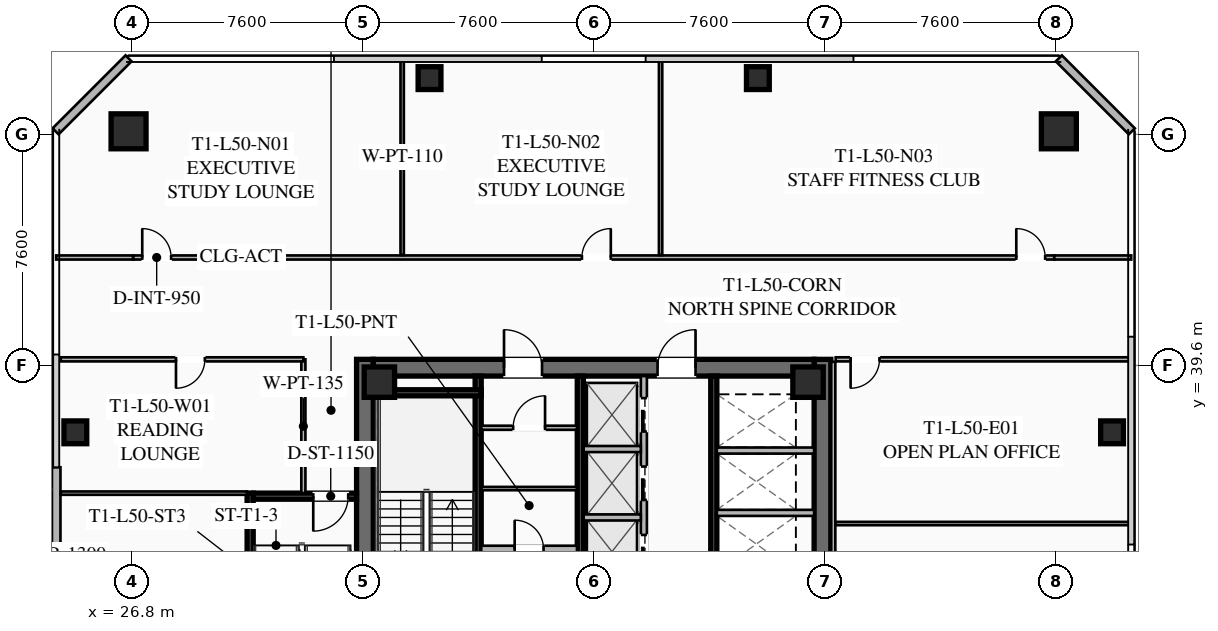
"""IFC4 building model, lengths in metres.
Left out: names, types, materials, properties, quantities, classifications, styles, units other than length and angle.
Written with IfcOpenShell. Run it as: python <this file> out.ifc"""

import sys

from ifc_helpers import new_model, si_unit, direction, frame, frame_2d, origin, origin_2d, place, context, subcontext, project, spatial, rectangle, hollow_rectangle, extrude, element, fill, save


model = new_model("IFC4")
c1 = context("Model", 3, precision=1e-05, world=origin(), true_north=direction((0.0, 1.0)))
c2 = subcontext(c1, "Body", "Model", "MODEL_VIEW")
j1 = project(units=[si_unit("LENGTHUNIT", "METRE"), si_unit("PLANEANGLEUNIT", "RADIAN")], contexts=[c1])
p1 = place(None, origin())
s1 = spatial("IfcSite", under=j1, at=p1, CompositionType="ELEMENT")
p2 = place(p1, origin())
s2 = spatial("IfcBuilding", under=s1, at=p2, CompositionType="ELEMENT")
p3 = place(p2, frame((0.0, 0.0, 185.4)))
s3 = spatial("IfcBuildingStorey", under=s2, at=p3, CompositionType="ELEMENT", Elevation=185.4)
for number, where, z_axis, x_axis in (
    (1, (34.475, 24.2, 0.0), (0.0, 0.0, 1.0), (0.0, 1.0, 0.0)),
    (2, (49.525, 39.8, 0.0), (0.0, 0.0, 1.0), (0.0, -1.0, 0.0)),
):
    element("IfcWall", number, at=place(p3, frame(where, z_axis=z_axis, x_axis=x_axis)), inside=s3, PredefinedType="SHEAR", context=c2, shape_type="SweptSolid", body=[
        extrude(rectangle(XDim=15.6, YDim=0.55, at=frame_2d((7.8, 0.0))), origin(), (0.0, 0.0, 1.0), 3.55),
    ])
p4 = place(p3, frame((34.75, 39.525, 0.0), z_axis=(0.0, 0.0, 1.0), x_axis=(1.0, 0.0, 0.0)))
e3 = element("IfcWall", 3, at=p4, inside=s3, PredefinedType="SHEAR", context=c2, shape_type="SweptSolid", body=[
    extrude(rectangle(XDim=14.5, YDim=0.55, at=frame_2d((7.25, 0.0))), origin(), (0.0, 0.0, 1.0), 3.55),
])
p5 = place(p4, frame((4.3, 0.0, 0.0)))
e4 = element("IfcOpeningElement", 4, at=p5, cuts=e3, PredefinedType="OPENING", context=c2, shape_type="SweptSolid", body=[
    extrude(rectangle(XDim=1.25, YDim=2.25, at=frame_2d((0.625, 1.125))), frame((0.0, 0.285, 0.0), z_axis=(0.0, -1.0, 0.0), x_axis=(1.0, 0.0, 0.0)), (0.0, 0.0, 1.0), 0.57),
])
p6 = place(p4, frame((9.35, 0.0, 0.0)))
e5 = element("IfcOpeningElement", 5, at=p6, cuts=e3, PredefinedType="OPENING", context=c2, shape_type="SweptSolid", body=[
    extrude(rectangle(XDim=1.25, YDim=2.25, at=frame_2d((0.625, 1.125))), frame((0.0, 0.285, 0.0), z_axis=(0.0, -1.0, 0.0), x_axis=(1.0, 0.0, 0.0)), (0.0, 0.0, 1.0), 0.57),
])
for number, where, z_axis, x_axis in (
    (6, (49.05, 39.05, 0.0), (0.0, 0.0, 1.0), (1.0, 0.0, 0.0)),
    (7, (34.95, 39.05, 0.0), (0.0, 0.0, 1.0), (1.0, 0.0, 0.0)),
):
    element("IfcColumn", number, at=place(p3, frame(where, z_axis=z_axis, x_axis=x_axis)), inside=s3, PredefinedType="COLUMN", context=c2, shape_type="SweptSolid", body=[
        extrude(hollow_rectangle(XDim=1.0, YDim=1.0, WallThickness=0.04, at=origin_2d()), origin(), (0.0, 0.0, 1.0), 3.37),
    ])
for number, where, z_axis, x_axis in (
    (8, (57.3, 47.3, 0.0), (0.0, 0.0, 1.0), (1.0, 0.0, 0.0)),
    (9, (26.7, 47.3, 0.0), (0.0, 0.0, 1.0), (1.0, 0.0, 0.0)),
):
    element("IfcColumn", number, at=place(p3, frame(where, z_axis=z_axis, x_axis=x_axis)), inside=s3, PredefinedType="COLUMN", context=c2, shape_type="SweptSolid", body=[
        extrude(hollow_rectangle(XDim=1.15, YDim=1.15, WallThickness=0.045, at=origin_2d()), origin(), (0.0, 0.0, 1.0), 3.37),
    ])
for number, where, z_axis, x_axis in (
    (10, (59.05, 37.4, 0.0), (0.0, 0.0, 1.0), (1.0, 0.0, 0.0)),
    (11, (47.4, 49.05, 0.0), (0.0, 0.0, 1.0), (1.0, 0.0, 0.0)),
    (12, (36.6, 49.05, 0.0), (0.0, 0.0, 1.0), (1.0, 0.0, 0.0)),
    (13, (24.95, 37.4, 0.0), (0.0, 0.0, 1.0), (1.0, 0.0, 0.0)),
):
    element("IfcColumn", number, at=place(p3, frame(where, z_axis=z_axis, x_axis=x_axis)), inside=s3, PredefinedType="COLUMN", context=c2, shape_type="SweptSolid", body=[
        extrude(hollow_rectangle(XDim=0.75, YDim=0.75, WallThickness=0.032, at=origin_2d()), origin(), (0.0, 0.0, 1.0), 3.37),
    ])
p7 = place(p3, frame((24.32, 27.75, 0.0), z_axis=(0.0, 0.0, 1.0), x_axis=(0.0, 1.0, 0.0)))
e14 = element("IfcWall", 14, at=p7, inside=s3, PredefinedType="SOLIDWALL", context=c2, shape_type="SweptSolid", body=[
    extrude(rectangle(XDim=8.5, YDim=0.28, at=frame_2d((4.25, 0.0))), origin(), (0.0, 0.0, 1.0), 3.37),
])
p8 = place(p7, frame((3.6, 0.0, 0.0)))
e15 = element("IfcOpeningElement", 15, at=p8, cuts=e14, PredefinedType="OPENING", context=c2, shape_type="SweptSolid", body=[
    extrude(rectangle(XDim=1.3, YDim=2.15, at=frame_2d((0.65, 1.075))), frame((0.0, 0.15, 0.0), z_axis=(0.0, -1.0, 0.0), x_axis=(1.0, 0.0, 0.0)), (0.0, 0.0, 1.0), 0.3),
])
for number, where, z_axis, x_axis in (
    (16, (24.3, 47.3, 0.0), (0.0, 0.0, 1.0), (0.707, 0.707, 0.0)),
    (17, (57.3, 49.7, 0.0), (0.0, 0.0, 1.0), (0.707, -0.707, 0.0)),
):
    element("IfcWall", number, at=place(p3, frame(where, z_axis=z_axis, x_axis=x_axis)), inside=s3, PredefinedType="SOLIDWALL", context=c2, shape_type="SweptSolid", body=[
        extrude(rectangle(XDim=3.394, YDim=0.28, at=frame_2d((1.697, 0.0))), origin(), (0.0, 0.0, 1.0), 3.37),
    ])
p9 = place(p3, frame((38.2, 31.2, 0.0), z_axis=(0.0, 0.0, 1.0), x_axis=(0.0, 1.0, 0.0)))
e18 = element("IfcWall", 18, at=p9, inside=s3, PredefinedType="SHEAR", context=c2, shape_type="SweptSolid", body=[
    extrude(rectangle(XDim=8.05, YDim=0.2, at=frame_2d((4.025, 0.0))), origin(), (0.0, 0.0, 1.0), 3.37),
])
p10 = place(p9, frame((0.45, 0.0, 0.0)))
e19 = element("IfcOpeningElement", 19, at=p10, cuts=e18, PredefinedType="OPENING", context=c2, shape_type="SweptSolid", body=[
    extrude(rectangle(XDim=1.15, YDim=2.2, at=frame_2d((0.575, 1.1))), frame((0.0, 0.11, 0.0), z_axis=(0.0, -1.0, 0.0), x_axis=(1.0, 0.0, 0.0)), (0.0, 0.0, 1.0), 0.22),
])
p11 = place(p3, frame((34.75, 38.7, 0.0), z_axis=(0.0, 0.0, 1.0), x_axis=(1.0, 0.0, 0.0)))
e20 = element("IfcWall", 20, at=p11, inside=s3, PredefinedType="SHEAR", context=c2, shape_type="SweptSolid", body=[
    extrude(rectangle(XDim=3.55, YDim=0.2, at=frame_2d((1.775, 0.0))), origin(), (0.0, 0.0, 1.0), 3.37),
])
p12 = place(p3, frame((41.56, 24.75, 0.0), z_axis=(0.0, 0.0, 1.0), x_axis=(0.0, 1.0, 0.0)))
e21 = element("IfcWall", 21, at=p12, inside=s3, PredefinedType="SHEAR", context=c2, shape_type="SweptSolid", body=[
    extrude(rectangle(XDim=14.5, YDim=0.2, at=frame_2d((7.25, 0.0))), origin(), (0.0, 0.0, 1.0), 3.37),
])
p13 = place(p3, frame((38.3, 33.56, 0.0), z_axis=(0.0, 0.0, 1.0), x_axis=(1.0, 0.0, 0.0)))
e22 = element("IfcWall", 22, at=p13, inside=s3, PredefinedType="SOLIDWALL", context=c2, shape_type="SweptSolid", body=[
    extrude(rectangle(XDim=3.15, YDim=0.22, at=frame_2d((1.575, 0.0))), origin(), (0.0, 0.0, 1.0), 2.723),
])
p14 = place(p13, frame((1.1, 0.0, 0.0)))
e23 = element("IfcOpeningElement", 23, at=p14, cuts=e22, PredefinedType="OPENING", context=c2, shape_type="SweptSolid", body=[
    extrude(rectangle(XDim=0.95, YDim=2.05, at=frame_2d((0.475, 1.025))), frame((0.0, 0.12, 0.0), z_axis=(0.0, -1.0, 0.0), x_axis=(1.0, 0.0, 0.0)), (0.0, 0.0, 1.0), 0.24),
])
p15 = place(p3, frame((45.95, 39.25, 0.0), z_axis=(0.0, 0.0, 1.0), x_axis=(0.0, -1.0, 0.0)))
e24 = element("IfcWall", 24, at=p15, inside=s3, PredefinedType="SHEAR", context=c2, shape_type="SweptSolid", body=[
    extrude(rectangle(XDim=6.45, YDim=0.2, at=frame_2d((3.225, 0.0))), origin(), (0.0, 0.0, 1.0), 3.37),
])
for number, where, z_axis, x_axis in (
    (25, (46.05, 34.75, 0.0), (0.0, 0.0, 1.0), (1.0, 0.0, 0.0)),
    (26, (46.05, 36.8, 0.0), (0.0, 0.0, 1.0), (1.0, 0.0, 0.0)),
):
    element("IfcWall", number, at=place(p3, frame(where, z_axis=z_axis, x_axis=x_axis)), inside=s3, PredefinedType="SOLIDWALL", context=c2, shape_type="SweptSolid", body=[
        extrude(rectangle(XDim=3.2, YDim=0.2, at=frame_2d((1.6, 0.0))), origin(), (0.0, 0.0, 1.0), 3.37),
    ])
p16 = place(p3, frame((38.3, 37.55, 0.0), z_axis=(0.0, 0.0, 1.0), x_axis=(1.0, 0.0, 0.0)))
e27 = element("IfcWall", 27, at=p16, inside=s3, PredefinedType="PARTITIONING", context=c2, shape_type="SweptSolid", body=[
    extrude(rectangle(XDim=3.15, YDim=0.135, at=frame_2d((1.575, 0.0))), origin(), (0.0, 0.0, 1.0), 2.723),
])
p17 = place(p16, frame((1.05, 0.0, 0.0)))
e28 = element("IfcOpeningElement", 28, at=p17, cuts=e27, PredefinedType="OPENING", context=c2, shape_type="SweptSolid", body=[
    extrude(rectangle(XDim=1.05, YDim=2.2, at=frame_2d((0.525, 1.1))), frame((0.0, 0.077, 0.0), z_axis=(0.0, -1.0, 0.0), x_axis=(1.0, 0.0, 0.0)), (0.0, 0.0, 1.0), 0.155),
])
p18 = place(p3, frame((38.3, 35.55, 0.0), z_axis=(0.0, 0.0, 1.0), x_axis=(1.0, 0.0, 0.0)))
e29 = element("IfcWall", 29, at=p18, inside=s3, PredefinedType="PARTITIONING", context=c2, shape_type="SweptSolid", body=[
    extrude(rectangle(XDim=3.15, YDim=0.11, at=frame_2d((1.575, 0.0))), origin(), (0.0, 0.0, 1.0), 2.723),
])
p19 = place(p3, frame((43.65, 32.35, 0.0), z_axis=(0.0, 0.0, 1.0), x_axis=(0.0, 1.0, 0.0)))
e30 = element("IfcWall", 30, at=p19, inside=s3, PredefinedType="SOLIDWALL", context=c2, shape_type="SweptSolid", body=[
    extrude(rectangle(XDim=6.9, YDim=0.2, at=frame_2d((3.45, 0.0))), origin(), (0.0, 0.0, 1.0), 3.37),
])
p20 = place(p19, frame((0.575, 0.0, 0.0)))
e31 = element("IfcOpeningElement", 31, at=p20, cuts=e30, PredefinedType="OPENING", context=c2, shape_type="SweptSolid", body=[
    extrude(rectangle(XDim=1.1, YDim=2.2, at=frame_2d((0.55, 1.1))), frame((0.0, 0.11, 0.0), z_axis=(0.0, -1.0, 0.0), x_axis=(1.0, 0.0, 0.0)), (0.0, 0.0, 1.0), 0.22),
])
p21 = place(p19, frame((2.825, 0.0, 0.0)))
e32 = element("IfcOpeningElement", 32, at=p21, cuts=e30, PredefinedType="OPENING", context=c2, shape_type="SweptSolid", body=[
    extrude(rectangle(XDim=1.1, YDim=2.2, at=frame_2d((0.55, 1.1))), frame((0.0, 0.11, 0.0), z_axis=(0.0, -1.0, 0.0), x_axis=(1.0, 0.0, 0.0)), (0.0, 0.0, 1.0), 0.22),
])
p22 = place(p19, frame((5.075, 0.0, 0.0)))
e33 = element("IfcOpeningElement", 33, at=p22, cuts=e30, PredefinedType="OPENING", context=c2, shape_type="SweptSolid", body=[
    extrude(rectangle(XDim=1.1, YDim=2.2, at=frame_2d((0.55, 1.1))), frame((0.0, 0.11, 0.0), z_axis=(0.0, -1.0, 0.0), x_axis=(1.0, 0.0, 0.0)), (0.0, 0.0, 1.0), 0.22),
])
for number, where, z_axis, x_axis in (
    (34, (41.67, 34.6, 0.0), (0.0, 0.0, 1.0), (1.0, 0.0, 0.0)),
    (35, (41.67, 36.85, 0.0), (0.0, 0.0, 1.0), (1.0, 0.0, 0.0)),
):
    element("IfcWall", number, at=place(p3, frame(where, z_axis=z_axis, x_axis=x_axis)), inside=s3, PredefinedType="SOLIDWALL", context=c2, shape_type="SweptSolid", body=[
        extrude(rectangle(XDim=1.88, YDim=0.2, at=frame_2d((0.94, 0.0))), origin(), (0.0, 0.0, 1.0), 3.37),
    ])
p23 = place(p3, frame((30.7, 28.6, 0.0), z_axis=(0.0, 0.0, 1.0), x_axis=(0.0, 1.0, 0.0)))
e36 = element("IfcWall", 36, at=p23, inside=s3, PredefinedType="SHEAR", context=c2, shape_type="SweptSolid", body=[
    extrude(rectangle(XDim=6.8, YDim=0.2, at=frame_2d((3.4, 0.0))), origin(), (0.0, 0.0, 1.0), 3.37),
])
p24 = place(p3, frame((34.2, 35.3, 0.0), z_axis=(0.0, 0.0, 1.0), x_axis=(-1.0, 0.0, 0.0)))
e37 = element("IfcWall", 37, at=p24, inside=s3, PredefinedType="SHEAR", context=c2, shape_type="SweptSolid", body=[
    extrude(rectangle(XDim=3.4, YDim=0.2, at=frame_2d((1.7, 0.0))), origin(), (0.0, 0.0, 1.0), 3.37),
])
p25 = place(p24, frame((0.275, 0.0, 0.0)))
e38 = element("IfcOpeningElement", 38, at=p25, cuts=e37, PredefinedType="OPENING", context=c2, shape_type="SweptSolid", body=[
    extrude(rectangle(XDim=1.15, YDim=2.2, at=frame_2d((0.575, 1.1))), frame((0.0, 0.11, 0.0), z_axis=(0.0, -1.0, 0.0), x_axis=(1.0, 0.0, 0.0)), (0.0, 0.0, 1.0), 0.22),
])
p26 = place(p3, frame((32.45, 35.4, 0.0), z_axis=(0.0, 0.0, 1.0), x_axis=(0.0, 1.0, 0.0)))
e39 = element("IfcWall", 39, at=p26, inside=s3, PredefinedType="PARTITIONING", context=c2, shape_type="SweptSolid", body=[
    extrude(rectangle(XDim=4.4, YDim=0.135, at=frame_2d((2.2, 0.0))), origin(), (0.0, 0.0, 1.0), 2.723),
])
p27 = place(p3, frame((26.85, 43.15, 0.0), z_axis=(0.0, 0.0, 1.0), x_axis=(1.0, 0.0, 0.0)))
e40 = element("IfcWall", 40, at=p27, inside=s3, PredefinedType="PARTITIONING", context=c2, shape_type="SweptSolid", body=[
    extrude(rectangle(XDim=30.3, YDim=0.135, at=frame_2d((15.15, 0.0))), origin(), (0.0, 0.0, 1.0), 2.723),
])
p28 = place(p27, frame((0.3, 0.0, 0.0)))
e41 = element("IfcOpeningElement", 41, at=p28, cuts=e40, PredefinedType="OPENING", context=c2, shape_type="SweptSolid", body=[
    extrude(rectangle(XDim=0.95, YDim=2.05, at=frame_2d((0.475, 1.025))), frame((0.0, 0.077, 0.0), z_axis=(0.0, -1.0, 0.0), x_axis=(1.0, 0.0, 0.0)), (0.0, 0.0, 1.0), 0.155),
])
p29 = place(p27, frame((14.763, 0.0, 0.0)))
e42 = element("IfcOpeningElement", 42, at=p29, cuts=e40, PredefinedType="OPENING", context=c2, shape_type="SweptSolid", body=[
    extrude(rectangle(XDim=0.95, YDim=2.05, at=frame_2d((0.475, 1.025))), frame((0.0, 0.077, 0.0), z_axis=(0.0, -1.0, 0.0), x_axis=(1.0, 0.0, 0.0)), (0.0, 0.0, 1.0), 0.155),
])
p30 = place(p27, frame((29.05, 0.0, 0.0)))
e43 = element("IfcOpeningElement", 43, at=p30, cuts=e40, PredefinedType="OPENING", context=c2, shape_type="SweptSolid", body=[
    extrude(rectangle(XDim=0.95, YDim=2.05, at=frame_2d((0.475, 1.025))), frame((0.0, 0.077, 0.0), z_axis=(0.0, -1.0, 0.0), x_axis=(1.0, 0.0, 0.0)), (0.0, 0.0, 1.0), 0.155),
])
for number, where, z_axis, x_axis in (
    (44, (24.32, 43.15, 0.0), (0.0, 0.0, 1.0), (1.0, 0.0, 0.0)),
    (45, (57.15, 43.15, 0.0), (0.0, 0.0, 1.0), (1.0, 0.0, 0.0)),
):
    element("IfcWall", number, at=place(p3, frame(where, z_axis=z_axis, x_axis=x_axis)), inside=s3, PredefinedType="PARTITIONING", context=c2, shape_type="SweptSolid", body=[
        extrude(rectangle(XDim=2.53, YDim=0.135, at=frame_2d((1.265, 0.0))), origin(), (0.0, 0.0, 1.0), 2.723),
    ])
for number, where, z_axis, x_axis in (
    (46, (35.7, 43.23, 0.0), (0.0, 0.0, 1.0), (0.0, 1.0, 0.0)),
    (47, (44.2, 43.23, 0.0), (0.0, 0.0, 1.0), (0.0, 1.0, 0.0)),
):
    element("IfcWall", number, at=place(p3, frame(where, z_axis=z_axis, x_axis=x_axis)), inside=s3, PredefinedType="PARTITIONING", context=c2, shape_type="SweptSolid", body=[
        extrude(rectangle(XDim=6.45, YDim=0.11, at=frame_2d((3.225, 0.0))), origin(), (0.0, 0.0, 1.0), 2.723),
    ])
p31 = place(p3, frame((49.88, 39.72, 0.0), z_axis=(0.0, 0.0, 1.0), x_axis=(0.0, -1.0, 0.0)))
e48 = element("IfcWall", 48, at=p31, inside=s3, PredefinedType="PARTITIONING", context=c2, shape_type="SweptSolid", body=[
    extrude(rectangle(XDim=15.44, YDim=0.135, at=frame_2d((7.72, 0.0))), origin(), (0.0, 0.0, 1.0), 2.723),
])
p32 = place(p3, frame((59.68, 39.8, 0.0), z_axis=(0.0, 0.0, 1.0), x_axis=(-1.0, 0.0, 0.0)))
e49 = element("IfcWall", 49, at=p32, inside=s3, PredefinedType="PARTITIONING", context=c2, shape_type="SweptSolid", body=[
    extrude(rectangle(XDim=9.72, YDim=0.135, at=frame_2d((4.86, 0.0))), origin(), (0.0, 0.0, 1.0), 2.723),
])
p33 = place(p32, frame((8.28, 0.0, 0.0)))
e50 = element("IfcOpeningElement", 50, at=p33, cuts=e49, PredefinedType="OPENING", context=c2, shape_type="SweptSolid", body=[
    extrude(rectangle(XDim=0.95, YDim=2.05, at=frame_2d((0.475, 1.025))), frame((0.0, 0.077, 0.0), z_axis=(0.0, -1.0, 0.0), x_axis=(1.0, 0.0, 0.0)), (0.0, 0.0, 1.0), 0.155),
])
p34 = place(p3, frame((49.96, 34.4, 0.0), z_axis=(0.0, 0.0, 1.0), x_axis=(1.0, 0.0, 0.0)))
e51 = element("IfcWall", 51, at=p34, inside=s3, PredefinedType="PARTITIONING", context=c2, shape_type="SweptSolid", body=[
    extrude(rectangle(XDim=9.72, YDim=0.11, at=frame_2d((4.86, 0.0))), origin(), (0.0, 0.0, 1.0), 2.723),
])
p35 = place(p3, frame((32.45, 39.8, 0.0), z_axis=(0.0, 0.0, 1.0), x_axis=(-1.0, 0.0, 0.0)))
e52 = element("IfcWall", 52, at=p35, inside=s3, PredefinedType="PARTITIONING", context=c2, shape_type="SweptSolid", body=[
    extrude(rectangle(XDim=7.98, YDim=0.135, at=frame_2d((3.99, 0.0))), origin(), (0.0, 0.0, 1.0), 2.723),
])
p36 = place(p35, frame((3.24, 0.0, 0.0)))
e53 = element("IfcOpeningElement", 53, at=p36, cuts=e52, PredefinedType="OPENING", context=c2, shape_type="SweptSolid", body=[
    extrude(rectangle(XDim=0.95, YDim=2.05, at=frame_2d((0.475, 1.025))), frame((0.0, 0.077, 0.0), z_axis=(0.0, -1.0, 0.0), x_axis=(1.0, 0.0, 0.0)), (0.0, 0.0, 1.0), 0.155),
])
p37 = place(p3, frame((30.6, 35.4, 0.0), z_axis=(0.0, 0.0, 1.0), x_axis=(-1.0, 0.0, 0.0)))
e54 = element("IfcWall", 54, at=p37, inside=s3, PredefinedType="PARTITIONING", context=c2, shape_type="SweptSolid", body=[
    extrude(rectangle(XDim=6.13, YDim=0.11, at=frame_2d((3.065, 0.0))), origin(), (0.0, 0.0, 1.0), 2.723),
])
p38 = place(p5, origin())
e55 = element("IfcDoor", 55, at=p38, inside=s3, OperationType="SINGLE_SWING_LEFT", PredefinedType="DOOR", context=c2, shape_type="SweptSolid", body=[
    extrude(rectangle(XDim=1.25, YDim=2.25, at=frame_2d((0.625, 1.125))), frame((0.0, 0.025, 0.0), z_axis=(0.0, -1.0, 0.0), x_axis=(1.0, 0.0, 0.0)), (0.0, 0.0, 1.0), 0.05),
])
fill(e4, e55)
p39 = place(p6, origin())
e56 = element("IfcDoor", 56, at=p39, inside=s3, OperationType="SINGLE_SWING_RIGHT", PredefinedType="DOOR", context=c2, shape_type="SweptSolid", body=[
    extrude(rectangle(XDim=1.25, YDim=2.25, at=frame_2d((0.625, 1.125))), frame((0.0, 0.025, 0.0), z_axis=(0.0, -1.0, 0.0), x_axis=(1.0, 0.0, 0.0)), (0.0, 0.0, 1.0), 0.05),
])
fill(e5, e56)
p40 = place(p17, origin())
e57 = element("IfcDoor", 57, at=p40, inside=s3, OperationType="SINGLE_SWING_RIGHT", PredefinedType="DOOR", context=c2, shape_type="SweptSolid", body=[
    extrude(rectangle(XDim=1.05, YDim=2.2, at=frame_2d((0.525, 1.1))), frame((0.0, 0.025, 0.0), z_axis=(0.0, -1.0, 0.0), x_axis=(1.0, 0.0, 0.0)), (0.0, 0.0, 1.0), 0.05),
])
fill(e28, e57)
p41 = place(p14, origin())
e58 = element("IfcDoor", 58, at=p41, inside=s3, OperationType="SINGLE_SWING_LEFT", PredefinedType="DOOR", context=c2, shape_type="SweptSolid", body=[
    extrude(rectangle(XDim=0.95, YDim=2.05, at=frame_2d((0.475, 1.025))), frame((0.0, 0.025, 0.0), z_axis=(0.0, -1.0, 0.0), x_axis=(1.0, 0.0, 0.0)), (0.0, 0.0, 1.0), 0.05),
])
fill(e23, e58)
p42 = place(p25, origin())
e59 = element("IfcDoor", 59, at=p42, inside=s3, OperationType="SINGLE_SWING_RIGHT", PredefinedType="DOOR", context=c2, shape_type="SweptSolid", body=[
    extrude(rectangle(XDim=1.15, YDim=2.2, at=frame_2d((0.575, 1.1))), frame((0.0, 0.025, 0.0), z_axis=(0.0, -1.0, 0.0), x_axis=(1.0, 0.0, 0.0)), (0.0, 0.0, 1.0), 0.05),
])
fill(e38, e59)
p43 = place(p28, origin())
e60 = element("IfcDoor", 60, at=p43, inside=s3, OperationType="SINGLE_SWING_LEFT", PredefinedType="DOOR", context=c2, shape_type="SweptSolid", body=[
    extrude(rectangle(XDim=0.95, YDim=2.05, at=frame_2d((0.475, 1.025))), frame((0.0, 0.025, 0.0), z_axis=(0.0, -1.0, 0.0), x_axis=(1.0, 0.0, 0.0)), (0.0, 0.0, 1.0), 0.05),
])
fill(e41, e60)
p44 = place(p29, origin())
e61 = element("IfcDoor", 61, at=p44, inside=s3, OperationType="SINGLE_SWING_RIGHT", PredefinedType="DOOR", context=c2, shape_type="SweptSolid", body=[
    extrude(rectangle(XDim=0.95, YDim=2.05, at=frame_2d((0.475, 1.025))), frame((0.0, 0.025, 0.0), z_axis=(0.0, -1.0, 0.0), x_axis=(1.0, 0.0, 0.0)), (0.0, 0.0, 1.0), 0.05),
])
fill(e42, e61)
p45 = place(p30, origin())
e62 = element("IfcDoor", 62, at=p45, inside=s3, OperationType="SINGLE_SWING_LEFT", PredefinedType="DOOR", context=c2, shape_type="SweptSolid", body=[
    extrude(rectangle(XDim=0.95, YDim=2.05, at=frame_2d((0.475, 1.025))), frame((0.0, 0.025, 0.0), z_axis=(0.0, -1.0, 0.0), x_axis=(1.0, 0.0, 0.0)), (0.0, 0.0, 1.0), 0.05),
])
fill(e43, e62)
p46 = place(p33, origin())
e63 = element("IfcDoor", 63, at=p46, inside=s3, OperationType="SINGLE_SWING_RIGHT", PredefinedType="DOOR", context=c2, shape_type="SweptSolid", body=[
    extrude(rectangle(XDim=0.95, YDim=2.05, at=frame_2d((0.475, 1.025))), frame((0.0, 0.025, 0.0), z_axis=(0.0, -1.0, 0.0), x_axis=(1.0, 0.0, 0.0)), (0.0, 0.0, 1.0), 0.05),
])
fill(e50, e63)
p47 = place(p36, origin())
e64 = element("IfcDoor", 64, at=p47, inside=s3, OperationType="SINGLE_SWING_RIGHT", PredefinedType="DOOR", context=c2, shape_type="SweptSolid", body=[
    extrude(rectangle(XDim=0.95, YDim=2.05, at=frame_2d((0.475, 1.025))), frame((0.0, 0.025, 0.0), z_axis=(0.0, -1.0, 0.0), x_axis=(1.0, 0.0, 0.0)), (0.0, 0.0, 1.0), 0.05),
])
fill(e53, e64)
p48 = place(p20, origin())
e65 = element("IfcDoor", 65, at=p48, inside=s3, OperationType="SLIDING_TO_LEFT", PredefinedType="DOOR", context=c2, shape_type="SweptSolid", body=[
    extrude(rectangle(XDim=1.1, YDim=2.2, at=frame_2d((0.55, 1.1))), frame((0.0, 0.025, 0.0), z_axis=(0.0, -1.0, 0.0), x_axis=(1.0, 0.0, 0.0)), (0.0, 0.0, 1.0), 0.05),
])
fill(e31, e65)
p49 = place(p21, origin())
e66 = element("IfcDoor", 66, at=p49, inside=s3, OperationType="SLIDING_TO_LEFT", PredefinedType="DOOR", context=c2, shape_type="SweptSolid", body=[
    extrude(rectangle(XDim=1.1, YDim=2.2, at=frame_2d((0.55, 1.1))), frame((0.0, 0.025, 0.0), z_axis=(0.0, -1.0, 0.0), x_axis=(1.0, 0.0, 0.0)), (0.0, 0.0, 1.0), 0.05),
])
fill(e32, e66)
p50 = place(p22, origin())
e67 = element("IfcDoor", 67, at=p50, inside=s3, OperationType="SLIDING_TO_LEFT", PredefinedType="DOOR", context=c2, shape_type="SweptSolid", body=[
    extrude(rectangle(XDim=1.1, YDim=2.2, at=frame_2d((0.55, 1.1))), frame((0.0, 0.025, 0.0), z_axis=(0.0, -1.0, 0.0), x_axis=(1.0, 0.0, 0.0)), (0.0, 0.0, 1.0), 0.05),
])
fill(e33, e67)
save(model, sys.argv[1])
